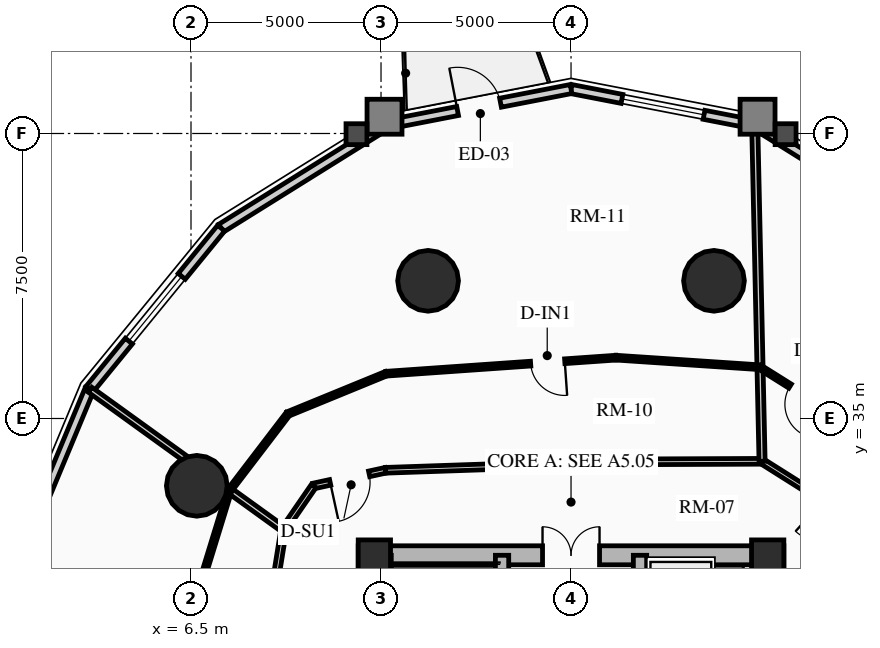
"""IFC4 building model, lengths in metres.
Left out: names, types, materials, properties, quantities, classifications, styles, units other than length and angle.
Written with IfcOpenShell. Run it as: python <this file> out.ifc"""

import sys

from ifc_helpers import new_model, si_unit, direction, frame, frame_2d, origin, origin_2d, place, context, subcontext, project, spatial, rectangle, circle, extrude, source, transform, mapped, element, fill, save


model = new_model("IFC4")
c1 = context("Model", 3, precision=1e-05, world=origin(), true_north=direction((0.0, 1.0)))
c2 = subcontext(c1, "Body", "Model", "MODEL_VIEW")
j1 = project(units=[si_unit("LENGTHUNIT", "METRE"), si_unit("PLANEANGLEUNIT", "RADIAN")], contexts=[c1])
p1 = place(None, origin())
s1 = spatial("IfcSite", under=j1, at=p1, CompositionType="ELEMENT")
p2 = place(p1, origin())
s2 = spatial("IfcBuilding", under=s1, at=p2, CompositionType="ELEMENT")
p3 = place(p2, frame((0.0, 0.0, 56.92)))
s3 = spatial("IfcBuildingStorey", under=s2, at=p3, CompositionType="ELEMENT", Elevation=56.92)
for number, where, z_axis, x_axis in (
    (1, (11.15, 17.35, 0.0), (0.0, 0.0, 1.0), (0.0, 1.0, 0.0)),
    (2, (21.85, 17.35, 0.0), (0.0, 0.0, 1.0), (0.0, 1.0, 0.0)),
):
    element("IfcWall", number, at=place(p3, frame(where, z_axis=z_axis, x_axis=x_axis)), inside=s3, PredefinedType="SHEAR", context=c2, shape_type="SweptSolid", body=[
        extrude(rectangle(XDim=14.3, YDim=0.5, at=frame_2d((7.15, 0.0))), origin(), (0.0, 0.0, 1.0), 2.91),
    ])
p4 = place(p3, frame((11.15, 31.4, 0.0), z_axis=(0.0, 0.0, 1.0), x_axis=(1.0, 0.0, 0.0)))
e3 = element("IfcWall", 3, at=p4, inside=s3, PredefinedType="SHEAR", context=c2, shape_type="SweptSolid", body=[
    extrude(rectangle(XDim=10.7, YDim=0.5, at=frame_2d((5.35, 0.0))), origin(), (0.0, 0.0, 1.0), 2.91),
])
m1 = source(origin(), c2, "Body", "SweptSolid", [
    extrude(rectangle(XDim=1.5, YDim=2.02, at=frame_2d((0.75, 1.01))), frame((0.0, 0.26, 0.0), z_axis=(0.0, -1.0, 0.0), x_axis=(1.0, 0.0, 0.0)), (0.0, 0.0, 1.0), 0.52),
])
p5 = place(p4, frame((4.6, 0.0, 0.0)))
e4 = element("IfcOpeningElement", 4, at=p5, cuts=e3, PredefinedType="OPENING", context=c2, shape_type="MappedRepresentation", body=[
    mapped(m1, transform((0.0, 0.0, 0.0), x_axis=(1.0, 0.0, 0.0), y_axis=(0.0, 1.0, 0.0), z_axis=(0.0, 0.0, 1.0), scale=1.0)),
])
p6 = place(p3, frame((14.685, 17.6, 0.0), z_axis=(0.0, 0.0, 1.0), x_axis=(0.0, 1.0, 0.0)))
e5 = element("IfcWall", 5, at=p6, inside=s3, PredefinedType="SHEAR", context=c2, shape_type="SweptSolid", body=[
    extrude(rectangle(XDim=13.8, YDim=0.35, at=frame_2d((6.9, 0.0))), origin(), (0.0, 0.0, 1.0), 2.91),
])
m2 = source(origin(), c2, "Body", "SweptSolid", [
    extrude(rectangle(XDim=1.1, YDim=2.015, at=frame_2d((0.55, 1.007))), frame((0.0, 0.185, 0.0), z_axis=(0.0, -1.0, 0.0), x_axis=(1.0, 0.0, 0.0)), (0.0, 0.0, 1.0), 0.37),
])
p7 = place(p6, frame((4.9, 0.0, 0.0)))
e6 = element("IfcOpeningElement", 6, at=p7, cuts=e5, PredefinedType="OPENING", context=c2, shape_type="MappedRepresentation", body=[
    mapped(m2, transform((0.0, 0.0, 0.0), x_axis=(1.0, 0.0, 0.0), y_axis=(0.0, 1.0, 0.0), z_axis=(0.0, 0.0, 1.0), scale=1.0)),
])
m3 = source(origin(), c2, "Body", "SweptSolid", [
    extrude(rectangle(XDim=1.15, YDim=2.02, at=frame_2d((0.575, 1.01))), frame((0.0, 0.185, 0.0), z_axis=(0.0, -1.0, 0.0), x_axis=(1.0, 0.0, 0.0)), (0.0, 0.0, 1.0), 0.37),
])
p8 = place(p6, frame((7.32, 0.0, 0.0)))
e7 = element("IfcOpeningElement", 7, at=p8, cuts=e5, PredefinedType="OPENING", context=c2, shape_type="MappedRepresentation", body=[
    mapped(m3, transform((0.0, 0.0, 0.0), x_axis=(1.0, 0.0, 0.0), y_axis=(0.0, 1.0, 0.0), z_axis=(0.0, 0.0, 1.0), scale=1.0)),
])
p9 = place(p3, frame((18.315, 17.6, 0.0), z_axis=(0.0, 0.0, 1.0), x_axis=(0.0, 1.0, 0.0)))
e8 = element("IfcWall", 8, at=p9, inside=s3, PredefinedType="SHEAR", context=c2, shape_type="SweptSolid", body=[
    extrude(rectangle(XDim=13.8, YDim=0.35, at=frame_2d((6.9, 0.0))), origin(), (0.0, 0.0, 1.0), 2.91),
])
p10 = place(p9, frame((10.025, 0.0, 0.0)))
e9 = element("IfcOpeningElement", 9, at=p10, cuts=e8, PredefinedType="OPENING", context=c2, shape_type="MappedRepresentation", body=[
    mapped(m2, transform((0.0, 0.0, 0.0), x_axis=(1.0, 0.0, 0.0), y_axis=(0.0, 1.0, 0.0), z_axis=(0.0, 0.0, 1.0), scale=1.0)),
])
p11 = place(p9, frame((12.025, 0.0, 0.0)))
e10 = element("IfcOpeningElement", 10, at=p11, cuts=e8, PredefinedType="OPENING", context=c2, shape_type="MappedRepresentation", body=[
    mapped(m2, transform((0.0, 0.0, 0.0), x_axis=(1.0, 0.0, 0.0), y_axis=(0.0, 1.0, 0.0), z_axis=(0.0, 0.0, 1.0), scale=1.0)),
])
p12 = place(p9, frame((5.33, 0.0, 0.0)))
e11 = element("IfcOpeningElement", 11, at=p12, cuts=e8, PredefinedType="OPENING", context=c2, shape_type="MappedRepresentation", body=[
    mapped(m3, transform((0.0, 0.0, 0.0), x_axis=(1.0, 0.0, 0.0), y_axis=(0.0, 1.0, 0.0), z_axis=(0.0, 0.0, 1.0), scale=1.0)),
])
p13 = place(p3, frame((11.595, 24.655, 0.0), z_axis=(0.0, 0.0, 1.0), x_axis=(0.0, 1.0, 0.0)))
e12 = element("IfcWall", 12, at=p13, inside=s3, PredefinedType="SHEAR", context=c2, shape_type="SweptSolid", body=[
    extrude(rectangle(XDim=6.745, YDim=0.35, at=frame_2d((3.373, 0.0))), origin(), (0.0, 0.0, 1.0), 2.91),
])
for number, where, z_axis, x_axis in (
    (13, (11.325, 31.38, 0.0), (0.0, 0.0, 1.0), (1.0, 0.0, 0.0)),
    (14, (21.675, 31.38, 0.0), (0.0, 0.0, 1.0), (1.0, 0.0, 0.0)),
):
    element("IfcColumn", number, at=place(p3, frame(where, z_axis=z_axis, x_axis=x_axis)), inside=s3, PredefinedType="COLUMN", context=c2, shape_type="SweptSolid", body=[
        extrude(rectangle(XDim=0.85, YDim=0.85, at=origin_2d()), origin(), (0.0, 0.0, 1.0), 2.91),
    ])
for number, where, z_axis, x_axis in (
    (15, (20.261, 38.623, 0.0), (0.0, 0.0, 1.0), (1.0, 0.0, 0.0)),
    (16, (12.739, 38.623, 0.0), (0.0, 0.0, 1.0), (1.0, 0.0, 0.0)),
    (17, (6.653, 33.229, 0.0), (0.0, 0.0, 1.0), (1.0, 0.0, 0.0)),
):
    element("IfcColumn", number, at=place(p3, frame(where, z_axis=z_axis, x_axis=x_axis)), inside=s3, PredefinedType="USERDEFINED", context=c2, shape_type="SweptSolid", body=[
        extrude(circle(Radius=0.8, at=origin_2d()), origin(), (0.0, 0.0, 1.0), 2.91),
    ])
p14 = place(p3, frame((21.34, 42.732, 0.0), z_axis=(0.0, 0.0, 1.0), x_axis=(0.848533613342, -0.529141481107, 0.0)))
e18 = element("IfcWall", 18, at=p14, inside=s3, PredefinedType="SOLIDWALL", context=c2, shape_type="SweptSolid", body=[
    extrude(rectangle(XDim=5.146, YDim=0.24, at=frame_2d((2.573, 0.0))), origin(), (0.0, 0.0, 1.0), 2.073),
])
p15 = place(p3, frame((16.5, 43.67, 0.0), z_axis=(0.0, 0.0, 1.0), x_axis=(0.981725274071, -0.190303668512, 0.0)))
e19 = element("IfcWall", 19, at=p15, inside=s3, PredefinedType="SOLIDWALL", context=c2, shape_type="SweptSolid", body=[
    extrude(rectangle(XDim=4.93, YDim=0.24, at=frame_2d((2.465, 0.0))), origin(), (0.0, 0.0, 1.0), 2.073),
])
m4 = source(origin(), c2, "Body", "SweptSolid", [
    extrude(rectangle(XDim=2.2, YDim=1.35, at=frame_2d((1.1, 0.675))), frame((0.0, 0.13, 0.0), z_axis=(0.0, -1.0, 0.0), x_axis=(1.0, 0.0, 0.0)), (0.0, 0.0, 1.0), 0.26),
])
p16 = place(p15, frame((1.365, 0.0, 0.65)))
e20 = element("IfcOpeningElement", 20, at=p16, cuts=e19, PredefinedType="OPENING", context=c2, shape_type="MappedRepresentation", body=[
    mapped(m4, transform((0.0, 0.0, 0.0), x_axis=(1.0, 0.0, 0.0), y_axis=(0.0, 1.0, 0.0), z_axis=(0.0, 0.0, 1.0), scale=1.0)),
])
p17 = place(p3, frame((11.66, 42.732, 0.0), z_axis=(0.0, 0.0, 1.0), x_axis=(0.981725274071, 0.190303668512, 0.0)))
e21 = element("IfcWall", 21, at=p17, inside=s3, PredefinedType="SOLIDWALL", context=c2, shape_type="SweptSolid", body=[
    extrude(rectangle(XDim=4.93, YDim=0.24, at=frame_2d((2.465, 0.0))), origin(), (0.0, 0.0, 1.0), 2.073),
])
m5 = source(origin(), c2, "Body", "SweptSolid", [
    extrude(rectangle(XDim=1.15, YDim=2.005, at=frame_2d((0.575, 1.002))), frame((0.0, 0.13, 0.0), z_axis=(0.0, -1.0, 0.0), x_axis=(1.0, 0.0, 0.0)), (0.0, 0.0, 1.0), 0.26),
])
p18 = place(p17, frame((1.89, 0.0, 0.0)))
e22 = element("IfcOpeningElement", 22, at=p18, cuts=e21, PredefinedType="OPENING", context=c2, shape_type="MappedRepresentation", body=[
    mapped(m5, transform((0.0, 0.0, 0.0), x_axis=(1.0, 0.0, 0.0), y_axis=(0.0, 1.0, 0.0), z_axis=(0.0, 0.0, 1.0), scale=1.0)),
])
p19 = place(p3, frame((7.293, 40.009, 0.0), z_axis=(0.0, 0.0, 1.0), x_axis=(0.848533613342, 0.529141481107, 0.0)))
e23 = element("IfcWall", 23, at=p19, inside=s3, PredefinedType="SOLIDWALL", context=c2, shape_type="SweptSolid", body=[
    extrude(rectangle(XDim=5.146, YDim=0.24, at=frame_2d((2.573, 0.0))), origin(), (0.0, 0.0, 1.0), 2.073),
])
p20 = place(p3, frame((3.828, 35.768, 0.0), z_axis=(0.0, 0.0, 1.0), x_axis=(0.632713287022, 0.77438614168, 0.0)))
e24 = element("IfcWall", 24, at=p20, inside=s3, PredefinedType="SOLIDWALL", context=c2, shape_type="SweptSolid", body=[
    extrude(rectangle(XDim=5.477, YDim=0.24, at=frame_2d((2.738, 0.0))), origin(), (0.0, 0.0, 1.0), 2.073),
])
p21 = place(p20, frame((1.638, 0.0, 0.65)))
e25 = element("IfcOpeningElement", 25, at=p21, cuts=e24, PredefinedType="OPENING", context=c2, shape_type="MappedRepresentation", body=[
    mapped(m4, transform((0.0, 0.0, 0.0), x_axis=(1.0, 0.0, 0.0), y_axis=(0.0, 1.0, 0.0), z_axis=(0.0, 0.0, 1.0), scale=1.0)),
])
p22 = place(p3, frame((1.604, 30.424, 0.0), z_axis=(0.0, 0.0, 1.0), x_axis=(0.384348836956, 0.923187939442, 0.0)))
e26 = element("IfcWall", 26, at=p22, inside=s3, PredefinedType="SOLIDWALL", context=c2, shape_type="SweptSolid", body=[
    extrude(rectangle(XDim=5.789, YDim=0.24, at=frame_2d((2.894, 0.0))), origin(), (0.0, 0.0, 1.0), 2.073),
])
p23 = place(p3, frame((22.877, 33.022, 0.0), z_axis=(0.0, 0.0, 1.0), x_axis=(-0.845895608855, 0.533348496689, 0.0)))
e27 = element("IfcWall", 27, at=p23, inside=s3, PredefinedType="PARTITIONING", context=c2, shape_type="SweptSolid", body=[
    extrude(rectangle(XDim=1.597, YDim=0.15, at=frame_2d((0.798, 0.0))), origin(), (0.0, 0.0, 1.0), 2.205),
])
p24 = place(p3, frame((21.527, 33.873, 0.0), z_axis=(0.0, 0.0, 1.0), x_axis=(-0.999991838845, -0.004040079574, 0.0)))
e28 = element("IfcWall", 28, at=p24, inside=s3, PredefinedType="PARTITIONING", context=c2, shape_type="SweptSolid", body=[
    extrude(rectangle(XDim=3.384, YDim=0.15, at=frame_2d((1.692, 0.0))), origin(), (0.0, 0.0, 1.0), 2.159),
])
p25 = place(p3, frame((18.143, 33.86, 0.0), z_axis=(0.0, 0.0, 1.0), x_axis=(-0.999419208319, -0.034077060363, 0.0)))
e29 = element("IfcWall", 29, at=p25, inside=s3, PredefinedType="PARTITIONING", context=c2, shape_type="SweptSolid", body=[
    extrude(rectangle(XDim=6.527, YDim=0.15, at=frame_2d((3.263, 0.0))), origin(), (0.0, 0.0, 1.0), 2.159),
])
p26 = place(p3, frame((11.62, 33.637, 0.0), z_axis=(0.0, 0.0, 1.0), x_axis=(-0.97702579435, -0.213121085711, 0.0)))
e30 = element("IfcWall", 30, at=p26, inside=s3, PredefinedType="PARTITIONING", context=c2, shape_type="SweptSolid", body=[
    extrude(rectangle(XDim=1.935, YDim=0.15, at=frame_2d((0.967, 0.0))), origin(), (0.0, 0.0, 1.0), 2.159),
])
m6 = source(origin(), c2, "Body", "SweptSolid", [
    extrude(rectangle(XDim=1.05, YDim=2.015, at=frame_2d((0.525, 1.007))), frame((0.0, 0.085, 0.0), z_axis=(0.0, -1.0, 0.0), x_axis=(1.0, 0.0, 0.0)), (0.0, 0.0, 1.0), 0.17),
])
p27 = place(p26, frame((0.442, 0.0, 0.0)))
e31 = element("IfcOpeningElement", 31, at=p27, cuts=e30, PredefinedType="OPENING", context=c2, shape_type="MappedRepresentation", body=[
    mapped(m6, transform((0.0, 0.0, 0.0), x_axis=(1.0, 0.0, 0.0), y_axis=(0.0, 1.0, 0.0), z_axis=(0.0, 0.0, 1.0), scale=1.0)),
])
p28 = place(p3, frame((9.729, 33.225, 0.0), z_axis=(0.0, 0.0, 1.0), x_axis=(-0.567183649484, -0.82359134755, 0.0)))
e32 = element("IfcWall", 32, at=p28, inside=s3, PredefinedType="PARTITIONING", context=c2, shape_type="SweptSolid", body=[
    extrude(rectangle(XDim=1.392, YDim=0.15, at=frame_2d((0.696, 0.0))), origin(), (0.0, 0.0, 1.0), 2.159),
])
p29 = place(p3, frame((8.94, 32.078, 0.0), z_axis=(0.0, 0.0, 1.0), x_axis=(-0.159148467753, -0.98725466077, 0.0)))
e33 = element("IfcWall", 33, at=p29, inside=s3, PredefinedType="PARTITIONING", context=c2, shape_type="SweptSolid", body=[
    extrude(rectangle(XDim=1.554, YDim=0.15, at=frame_2d((0.777, 0.0))), origin(), (0.0, 0.0, 1.0), 2.205),
])
p30 = place(p3, frame((21.527, 33.873, 0.0), z_axis=(0.0, 0.0, 1.0), x_axis=(-0.021814395676, 0.999762037758, 0.0)))
e34 = element("IfcWall", 34, at=p30, inside=s3, PredefinedType="PARTITIONING", context=c2, shape_type="SweptSolid", body=[
    extrude(rectangle(XDim=8.842, YDim=0.16, at=frame_2d((4.421, 0.0))), origin(), (0.0, 0.0, 1.0), 2.073),
])
p31 = place(p3, frame((8.94, 32.078, 0.0), z_axis=(0.0, 0.0, 1.0), x_axis=(-0.810854375189, 0.585247966453, 0.0)))
e35 = element("IfcWall", 35, at=p31, inside=s3, PredefinedType="PARTITIONING", context=c2, shape_type="SweptSolid", body=[
    extrude(rectangle(XDim=6.284, YDim=0.16, at=frame_2d((3.142, 0.0))), origin(), (0.0, 0.0, 1.0), 2.073),
])
p32 = place(p3, frame((23.666, 34.974, 0.0), z_axis=(0.0, 0.0, 1.0), x_axis=(-0.847319394731, 0.531083650014, 0.0)))
e36 = element("IfcWall", 36, at=p32, inside=s3, PredefinedType="PARTITIONING", context=c2, shape_type="SweptSolid", body=[
    extrude(rectangle(XDim=2.589, YDim=0.125, at=frame_2d((1.294, 0.0))), origin(), (0.0, 0.0, 1.0), 2.205),
])
m7 = source(origin(), c2, "Body", "SweptSolid", [
    extrude(rectangle(XDim=0.9, YDim=2.005, at=frame_2d((0.45, 1.002))), frame((0.0, 0.073, 0.0), z_axis=(0.0, -1.0, 0.0), x_axis=(1.0, 0.0, 0.0)), (0.0, 0.0, 1.0), 0.145),
])
p33 = place(p32, frame((0.754, 0.0, 0.0)))
e37 = element("IfcOpeningElement", 37, at=p33, cuts=e36, PredefinedType="OPENING", context=c2, shape_type="MappedRepresentation", body=[
    mapped(m7, transform((0.0, 0.0, 0.0), x_axis=(1.0, 0.0, 0.0), y_axis=(0.0, 1.0, 0.0), z_axis=(0.0, 0.0, 1.0), scale=1.0)),
])
p34 = place(p3, frame((21.473, 36.348, 0.0), z_axis=(0.0, 0.0, 1.0), x_axis=(-0.997789137643, 0.066459286803, 0.0)))
e38 = element("IfcWall", 38, at=p34, inside=s3, PredefinedType="PARTITIONING", context=c2, shape_type="SweptSolid", body=[
    extrude(rectangle(XDim=3.798, YDim=0.125, at=frame_2d((1.899, 0.0))), origin(), (0.0, 0.0, 1.0), 2.159),
])
p35 = place(p3, frame((17.683, 36.601, 0.0), z_axis=(0.0, 0.0, 1.0), x_axis=(-0.997569247495, -0.06968210998, 0.0)))
e39 = element("IfcWall", 39, at=p35, inside=s3, PredefinedType="PARTITIONING", context=c2, shape_type="SweptSolid", body=[
    extrude(rectangle(XDim=6.065, YDim=0.125, at=frame_2d((3.032, 0.0))), origin(), (0.0, 0.0, 1.0), 2.159),
])
p36 = place(p35, frame((1.351, 0.0, 0.0)))
e40 = element("IfcOpeningElement", 40, at=p36, cuts=e39, PredefinedType="OPENING", context=c2, shape_type="MappedRepresentation", body=[
    mapped(m7, transform((0.0, 0.0, 0.0), x_axis=(1.0, 0.0, 0.0), y_axis=(0.0, 1.0, 0.0), z_axis=(0.0, 0.0, 1.0), scale=1.0)),
])
p37 = place(p3, frame((11.633, 36.178, 0.0), z_axis=(0.0, 0.0, 1.0), x_axis=(-0.92528752303, -0.379266396779, 0.0)))
e41 = element("IfcWall", 41, at=p37, inside=s3, PredefinedType="PARTITIONING", context=c2, shape_type="SweptSolid", body=[
    extrude(rectangle(XDim=2.791, YDim=0.125, at=frame_2d((1.395, 0.0))), origin(), (0.0, 0.0, 1.0), 2.205),
])
p38 = place(p3, frame((9.051, 35.12, 0.0), z_axis=(0.0, 0.0, 1.0), x_axis=(-0.607256827378, -0.79450559822, 0.0)))
e42 = element("IfcWall", 42, at=p38, inside=s3, PredefinedType="PARTITIONING", context=c2, shape_type="SweptSolid", body=[
    extrude(rectangle(XDim=2.532, YDim=0.125, at=frame_2d((1.266, 0.0))), origin(), (0.0, 0.0, 1.0), 2.073),
])
p39 = place(p3, frame((7.513, 33.108, 0.0), z_axis=(0.0, 0.0, 1.0), x_axis=(-0.294167851511, -0.955753773279, 0.0)))
e43 = element("IfcWall", 43, at=p39, inside=s3, PredefinedType="PARTITIONING", context=c2, shape_type="SweptSolid", body=[
    extrude(rectangle(XDim=2.72, YDim=0.125, at=frame_2d((1.36, 0.0))), origin(), (0.0, 0.0, 1.0), 2.159),
])
m8 = source(origin(), c2, "Body", "SweptSolid", [
    extrude(rectangle(XDim=2.2, YDim=1.35, at=frame_2d((1.1, 0.675))), frame((0.0, 0.03, 0.0), z_axis=(0.0, -1.0, 0.0), x_axis=(1.0, 0.0, 0.0)), (0.0, 0.0, 1.0), 0.06),
])
p40 = place(p16, origin())
e44 = element("IfcWindow", 44, at=p40, inside=s3, PartitioningType="DOUBLE_PANEL_VERTICAL", PredefinedType="WINDOW", context=c2, shape_type="MappedRepresentation", body=[
    mapped(m8, transform((0.0, 0.0, 0.0), x_axis=(1.0, 0.0, 0.0), y_axis=(0.0, 1.0, 0.0), z_axis=(0.0, 0.0, 1.0), scale=1.0)),
])
fill(e20, e44)
m9 = source(origin(), c2, "Body", "SweptSolid", [
    extrude(rectangle(XDim=1.15, YDim=2.005, at=frame_2d((0.575, 1.002))), frame((0.0, 0.025, 0.0), z_axis=(0.0, -1.0, 0.0), x_axis=(1.0, 0.0, 0.0)), (0.0, 0.0, 1.0), 0.05),
])
p41 = place(p18, origin())
e45 = element("IfcDoor", 45, at=p41, inside=s3, OperationType="SINGLE_SWING_LEFT", PredefinedType="DOOR", context=c2, shape_type="MappedRepresentation", body=[
    mapped(m9, transform((0.0, 0.0, 0.0), x_axis=(1.0, 0.0, 0.0), y_axis=(0.0, 1.0, 0.0), z_axis=(0.0, 0.0, 1.0), scale=1.0)),
])
fill(e22, e45)
p42 = place(p21, origin())
e46 = element("IfcWindow", 46, at=p42, inside=s3, PartitioningType="DOUBLE_PANEL_VERTICAL", PredefinedType="WINDOW", context=c2, shape_type="MappedRepresentation", body=[
    mapped(m8, transform((0.0, 0.0, 0.0), x_axis=(1.0, 0.0, 0.0), y_axis=(0.0, 1.0, 0.0), z_axis=(0.0, 0.0, 1.0), scale=1.0)),
])
fill(e25, e46)
m10 = source(origin(), c2, "Body", "SweptSolid", [
    extrude(rectangle(XDim=1.5, YDim=2.02, at=frame_2d((0.75, 1.01))), frame((0.0, 0.025, 0.0), z_axis=(0.0, -1.0, 0.0), x_axis=(1.0, 0.0, 0.0)), (0.0, 0.0, 1.0), 0.05),
])
p43 = place(p5, origin())
e47 = element("IfcDoor", 47, at=p43, inside=s3, OperationType="DOUBLE_DOOR_SINGLE_SWING", PredefinedType="DOOR", context=c2, shape_type="MappedRepresentation", body=[
    mapped(m10, transform((0.0, 0.0, 0.0), x_axis=(1.0, 0.0, 0.0), y_axis=(0.0, 1.0, 0.0), z_axis=(0.0, 0.0, 1.0), scale=1.0)),
])
fill(e4, e47)
m11 = source(origin(), c2, "Body", "SweptSolid", [
    extrude(rectangle(XDim=0.9, YDim=2.005, at=frame_2d((0.45, 1.002))), frame((0.0, 0.025, 0.0), z_axis=(0.0, -1.0, 0.0), x_axis=(1.0, 0.0, 0.0)), (0.0, 0.0, 1.0), 0.05),
])
p44 = place(p33, origin())
e48 = element("IfcDoor", 48, at=p44, inside=s3, OperationType="SINGLE_SWING_LEFT", PredefinedType="DOOR", context=c2, shape_type="MappedRepresentation", body=[
    mapped(m11, transform((0.0, 0.0, 0.0), x_axis=(1.0, 0.0, 0.0), y_axis=(0.0, 1.0, 0.0), z_axis=(0.0, 0.0, 1.0), scale=1.0)),
])
fill(e37, e48)
m12 = source(origin(), c2, "Body", "SweptSolid", [
    extrude(rectangle(XDim=1.05, YDim=2.015, at=frame_2d((0.525, 1.007))), frame((0.0, 0.025, 0.0), z_axis=(0.0, -1.0, 0.0), x_axis=(1.0, 0.0, 0.0)), (0.0, 0.0, 1.0), 0.05),
])
p45 = place(p27, origin())
e49 = element("IfcDoor", 49, at=p45, inside=s3, OperationType="SINGLE_SWING_RIGHT", PredefinedType="DOOR", context=c2, shape_type="MappedRepresentation", body=[
    mapped(m12, transform((0.0, 0.0, 0.0), x_axis=(1.0, 0.0, 0.0), y_axis=(0.0, 1.0, 0.0), z_axis=(0.0, 0.0, 1.0), scale=1.0)),
])
fill(e31, e49)
p46 = place(p36, origin())
e50 = element("IfcDoor", 50, at=p46, inside=s3, OperationType="SINGLE_SWING_LEFT", PredefinedType="DOOR", context=c2, shape_type="MappedRepresentation", body=[
    mapped(m11, transform((0.0, 0.0, 0.0), x_axis=(1.0, 0.0, 0.0), y_axis=(0.0, 1.0, 0.0), z_axis=(0.0, 0.0, 1.0), scale=1.0)),
])
fill(e40, e50)
save(model, sys.argv[1])
